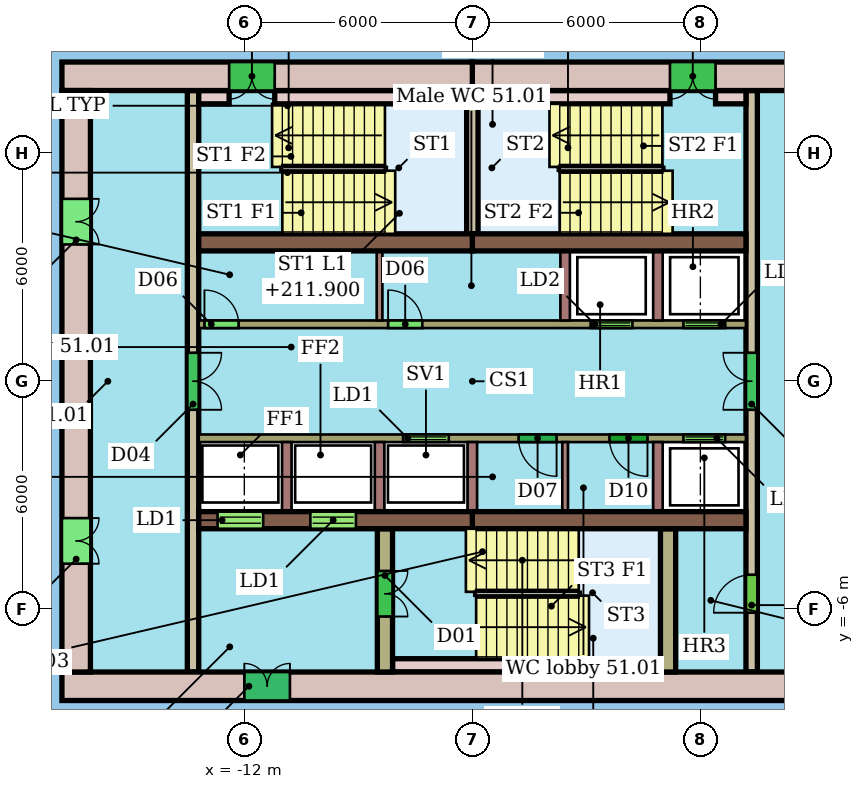
"""IFC4 building model, lengths in metres.
Left out: names, types, materials, properties, quantities, classifications, styles, units other than length and angle.
Written with IfcOpenShell. Run it as: python <this file> out.ifc"""

import sys

from ifc_helpers import new_model, si_unit, direction, frame, frame_2d, origin, place, context, subcontext, project, spatial, rectangle, extrude, element, fill, save


model = new_model("IFC4")
c1 = context("Model", 3, precision=1e-05, world=origin(), true_north=direction((0.0, 1.0)))
c2 = subcontext(c1, "Body", "Model", "MODEL_VIEW")
j1 = project(units=[si_unit("LENGTHUNIT", "METRE"), si_unit("PLANEANGLEUNIT", "RADIAN")], contexts=[c1])
p1 = place(None, origin())
s1 = spatial("IfcSite", under=j1, at=p1, CompositionType="ELEMENT")
p2 = place(p1, origin())
s2 = spatial("IfcBuilding", under=s1, at=p2, CompositionType="ELEMENT")
p3 = place(p2, frame((0.0, 0.0, 210.1)))
s3 = spatial("IfcBuildingStorey", under=s2, at=p3, CompositionType="ELEMENT", Elevation=210.1)
p4 = place(p3, frame((4.8, 8.025, 0.0), z_axis=(0.0, 0.0, 1.0), x_axis=(-1.0, 0.0, 0.0)))
e1 = element("IfcWall", 1, at=p4, inside=s3, PredefinedType="SHEAR", context=c2, shape_type="SweptSolid", body=[
    extrude(rectangle(XDim=10.8, YDim=0.75, at=frame_2d((5.4, 0.0))), origin(), (0.0, 0.0, 1.0), 3.3),
])
p5 = place(p4, frame((4.4, 0.0, 0.0)))
e2 = element("IfcOpeningElement", 2, at=p5, cuts=e1, PredefinedType="OPENING", context=c2, shape_type="SweptSolid", body=[
    extrude(rectangle(XDim=1.2, YDim=2.1, at=frame_2d((0.6, 1.05))), frame((0.0, 0.385, 0.0), z_axis=(0.0, -1.0, 0.0), x_axis=(1.0, 0.0, 0.0)), (0.0, 0.0, 1.0), 0.77),
])
p6 = place(p3, frame((-6.0, 8.025, 0.0), z_axis=(0.0, 0.0, 1.0), x_axis=(-1.0, 0.0, 0.0)))
e3 = element("IfcWall", 3, at=p6, inside=s3, PredefinedType="SHEAR", context=c2, shape_type="SweptSolid", body=[
    extrude(rectangle(XDim=10.8, YDim=0.75, at=frame_2d((5.4, 0.0))), origin(), (0.0, 0.0, 1.0), 3.3),
])
p7 = place(p6, frame((5.2, 0.0, 0.0)))
e4 = element("IfcOpeningElement", 4, at=p7, cuts=e3, PredefinedType="OPENING", context=c2, shape_type="SweptSolid", body=[
    extrude(rectangle(XDim=1.2, YDim=2.1, at=frame_2d((0.6, 1.05))), frame((0.0, 0.385, 0.0), z_axis=(0.0, -1.0, 0.0), x_axis=(1.0, 0.0, 0.0)), (0.0, 0.0, 1.0), 0.77),
])
p8 = place(p3, frame((-16.8, -8.025, 0.0), z_axis=(0.0, 0.0, 1.0), x_axis=(1.0, 0.0, 0.0)))
e5 = element("IfcWall", 5, at=p8, inside=s3, PredefinedType="SHEAR", context=c2, shape_type="SweptSolid", body=[
    extrude(rectangle(XDim=21.6, YDim=0.75, at=frame_2d((10.8, 0.0))), origin(), (0.0, 0.0, 1.0), 3.3),
])
p9 = place(p8, frame((4.8, 0.0, 0.0)))
e6 = element("IfcOpeningElement", 6, at=p9, cuts=e5, PredefinedType="OPENING", context=c2, shape_type="SweptSolid", body=[
    extrude(rectangle(XDim=1.2, YDim=2.1, at=frame_2d((0.6, 1.05))), frame((0.0, 0.385, 0.0), z_axis=(0.0, -1.0, 0.0), x_axis=(1.0, 0.0, 0.0)), (0.0, 0.0, 1.0), 0.77),
])
p10 = place(p3, frame((-16.425, 7.65, 0.0), z_axis=(0.0, 0.0, 1.0), x_axis=(0.0, -1.0, 0.0)))
e7 = element("IfcWall", 7, at=p10, inside=s3, PredefinedType="SHEAR", context=c2, shape_type="SweptSolid", body=[
    extrude(rectangle(XDim=15.3, YDim=0.75, at=frame_2d((7.65, 0.0))), origin(), (0.0, 0.0, 1.0), 3.3),
])
p11 = place(p10, frame((11.25, 0.0, 0.0)))
e8 = element("IfcOpeningElement", 8, at=p11, cuts=e7, PredefinedType="OPENING", context=c2, shape_type="SweptSolid", body=[
    extrude(rectangle(XDim=1.2, YDim=2.1, at=frame_2d((0.6, 1.05))), frame((0.0, 0.385, 0.0), z_axis=(0.0, -1.0, 0.0), x_axis=(1.0, 0.0, 0.0)), (0.0, 0.0, 1.0), 0.77),
])
p12 = place(p10, frame((2.85, 0.0, 0.0)))
e9 = element("IfcOpeningElement", 9, at=p12, cuts=e7, PredefinedType="OPENING", context=c2, shape_type="SweptSolid", body=[
    extrude(rectangle(XDim=1.2, YDim=2.1, at=frame_2d((0.6, 1.05))), frame((0.0, 0.385, 0.0), z_axis=(0.0, -1.0, 0.0), x_axis=(1.0, 0.0, 0.0)), (0.0, 0.0, 1.0), 0.77),
])
for number, where, z_axis, x_axis in (
    (10, (-13.2, 3.655, 0.0), (0.0, 0.0, 1.0), (1.0, 0.0, 0.0)),
    (11, (-6.0, 3.655, 0.0), (0.0, 0.0, 1.0), (1.0, 0.0, 0.0)),
):
    element("IfcWall", number, at=place(p3, frame(where, z_axis=z_axis, x_axis=x_axis)), inside=s3, PredefinedType="SHEAR", context=c2, shape_type="SweptSolid", body=[
        extrude(rectangle(XDim=7.2, YDim=0.45, at=frame_2d((3.6, 0.0))), origin(), (0.0, 0.0, 1.0), 3.3),
    ])
p13 = place(p3, frame((-13.2, -3.655, 0.0), z_axis=(0.0, 0.0, 1.0), x_axis=(1.0, 0.0, 0.0)))
e12 = element("IfcWall", 12, at=p13, inside=s3, PredefinedType="SHEAR", context=c2, shape_type="SweptSolid", body=[
    extrude(rectangle(XDim=7.2, YDim=0.45, at=frame_2d((3.6, 0.0))), origin(), (0.0, 0.0, 1.0), 3.3),
])
p14 = place(p13, frame((0.496, 0.0, 0.0)))
e13 = element("IfcOpeningElement", 13, at=p14, cuts=e12, PredefinedType="OPENING", context=c2, shape_type="SweptSolid", body=[
    extrude(rectangle(XDim=1.2, YDim=2.1, at=frame_2d((0.6, 1.05))), frame((0.0, 0.235, 0.0), z_axis=(0.0, -1.0, 0.0), x_axis=(1.0, 0.0, 0.0)), (0.0, 0.0, 1.0), 0.47),
])
p15 = place(p13, frame((2.938, 0.0, 0.0)))
e14 = element("IfcOpeningElement", 14, at=p15, cuts=e12, PredefinedType="OPENING", context=c2, shape_type="SweptSolid", body=[
    extrude(rectangle(XDim=1.2, YDim=2.1, at=frame_2d((0.6, 1.05))), frame((0.0, 0.235, 0.0), z_axis=(0.0, -1.0, 0.0), x_axis=(1.0, 0.0, 0.0)), (0.0, 0.0, 1.0), 0.47),
])
p16 = place(p3, frame((-6.0, -3.655, 0.0), z_axis=(0.0, 0.0, 1.0), x_axis=(1.0, 0.0, 0.0)))
e15 = element("IfcWall", 15, at=p16, inside=s3, PredefinedType="SHEAR", context=c2, shape_type="SweptSolid", body=[
    extrude(rectangle(XDim=7.2, YDim=0.45, at=frame_2d((3.6, 0.0))), origin(), (0.0, 0.0, 1.0), 3.3),
])
p17 = place(p3, frame((-13.35, 7.65, 0.0), z_axis=(0.0, 0.0, 1.0), x_axis=(0.0, -1.0, 0.0)))
e16 = element("IfcWall", 16, at=p17, inside=s3, PredefinedType="SHEAR", context=c2, shape_type="SweptSolid", body=[
    extrude(rectangle(XDim=15.3, YDim=0.3, at=frame_2d((7.65, 0.0))), origin(), (0.0, 0.0, 1.0), 3.3),
])
p18 = place(p17, frame((6.9, 0.0, 0.0)))
e17 = element("IfcOpeningElement", 17, at=p18, cuts=e16, PredefinedType="OPENING", context=c2, shape_type="SweptSolid", body=[
    extrude(rectangle(XDim=1.5, YDim=2.1, at=frame_2d((0.75, 1.05))), frame((0.0, 0.16, 0.0), z_axis=(0.0, -1.0, 0.0), x_axis=(1.0, 0.0, 0.0)), (0.0, 0.0, 1.0), 0.32),
])
p19 = place(p3, frame((1.35, -7.65, 0.0), z_axis=(0.0, 0.0, 1.0), x_axis=(0.0, 1.0, 0.0)))
e18 = element("IfcWall", 18, at=p19, inside=s3, PredefinedType="SHEAR", context=c2, shape_type="SweptSolid", body=[
    extrude(rectangle(XDim=15.3, YDim=0.3, at=frame_2d((7.65, 0.0))), origin(), (0.0, 0.0, 1.0), 3.3),
])
p20 = place(p19, frame((1.56, 0.0, 0.0)))
e19 = element("IfcOpeningElement", 19, at=p20, cuts=e18, PredefinedType="OPENING", context=c2, shape_type="SweptSolid", body=[
    extrude(rectangle(XDim=1.0, YDim=2.1, at=frame_2d((0.5, 1.05))), frame((0.0, 0.16, 0.0), z_axis=(0.0, -1.0, 0.0), x_axis=(1.0, 0.0, 0.0)), (0.0, 0.0, 1.0), 0.32),
])
p21 = place(p19, frame((6.9, 0.0, 0.0)))
e20 = element("IfcOpeningElement", 20, at=p21, cuts=e18, PredefinedType="OPENING", context=c2, shape_type="SweptSolid", body=[
    extrude(rectangle(XDim=1.5, YDim=2.1, at=frame_2d((0.75, 1.05))), frame((0.0, 0.16, 0.0), z_axis=(0.0, -1.0, 0.0), x_axis=(1.0, 0.0, 0.0)), (0.0, 0.0, 1.0), 0.32),
])
p22 = place(p3, frame((-13.2, 1.5, 0.0), z_axis=(0.0, 0.0, 1.0), x_axis=(1.0, 0.0, 0.0)))
e21 = element("IfcWall", 21, at=p22, inside=s3, PredefinedType="SHEAR", context=c2, shape_type="SweptSolid", body=[
    extrude(rectangle(XDim=14.4, YDim=0.2, at=frame_2d((7.2, 0.0))), origin(), (0.0, 0.0, 1.0), 3.3),
])
p23 = place(p22, frame((10.312, 0.0, 0.0)))
e22 = element("IfcOpeningElement", 22, at=p23, cuts=e21, PredefinedType="OPENING", context=c2, shape_type="SweptSolid", body=[
    extrude(rectangle(XDim=1.1, YDim=2.1, at=frame_2d((0.55, 1.05))), frame((0.0, 0.11, 0.0), z_axis=(0.0, -1.0, 0.0), x_axis=(1.0, 0.0, 0.0)), (0.0, 0.0, 1.0), 0.22),
])
p24 = place(p22, frame((12.754, 0.0, 0.0)))
e23 = element("IfcOpeningElement", 23, at=p24, cuts=e21, PredefinedType="OPENING", context=c2, shape_type="SweptSolid", body=[
    extrude(rectangle(XDim=1.1, YDim=2.1, at=frame_2d((0.55, 1.05))), frame((0.0, 0.11, 0.0), z_axis=(0.0, -1.0, 0.0), x_axis=(1.0, 0.0, 0.0)), (0.0, 0.0, 1.0), 0.22),
])
p25 = place(p22, frame((0.15, 0.0, 0.0)))
e24 = element("IfcOpeningElement", 24, at=p25, cuts=e21, PredefinedType="OPENING", context=c2, shape_type="SweptSolid", body=[
    extrude(rectangle(XDim=0.9, YDim=2.1, at=frame_2d((0.45, 1.05))), frame((0.0, 0.11, 0.0), z_axis=(0.0, -1.0, 0.0), x_axis=(1.0, 0.0, 0.0)), (0.0, 0.0, 1.0), 0.22),
])
p26 = place(p22, frame((4.983, 0.0, 0.0)))
e25 = element("IfcOpeningElement", 25, at=p26, cuts=e21, PredefinedType="OPENING", context=c2, shape_type="SweptSolid", body=[
    extrude(rectangle(XDim=0.9, YDim=2.1, at=frame_2d((0.45, 1.05))), frame((0.0, 0.11, 0.0), z_axis=(0.0, -1.0, 0.0), x_axis=(1.0, 0.0, 0.0)), (0.0, 0.0, 1.0), 0.22),
])
p27 = place(p3, frame((1.2, -1.5, 0.0), z_axis=(0.0, 0.0, 1.0), x_axis=(-1.0, 0.0, 0.0)))
e26 = element("IfcWall", 26, at=p27, inside=s3, PredefinedType="SHEAR", context=c2, shape_type="SweptSolid", body=[
    extrude(rectangle(XDim=14.4, YDim=0.2, at=frame_2d((7.2, 0.0))), origin(), (0.0, 0.0, 1.0), 3.3),
])
p28 = place(p27, frame((7.821, 0.0, 0.0)))
e27 = element("IfcOpeningElement", 27, at=p28, cuts=e26, PredefinedType="OPENING", context=c2, shape_type="SweptSolid", body=[
    extrude(rectangle(XDim=1.2, YDim=2.1, at=frame_2d((0.6, 1.05))), frame((0.0, 0.11, 0.0), z_axis=(0.0, -1.0, 0.0), x_axis=(1.0, 0.0, 0.0)), (0.0, 0.0, 1.0), 0.22),
])
p29 = place(p27, frame((0.546, 0.0, 0.0)))
e28 = element("IfcOpeningElement", 28, at=p29, cuts=e26, PredefinedType="OPENING", context=c2, shape_type="SweptSolid", body=[
    extrude(rectangle(XDim=1.1, YDim=2.1, at=frame_2d((0.55, 1.05))), frame((0.0, 0.11, 0.0), z_axis=(0.0, -1.0, 0.0), x_axis=(1.0, 0.0, 0.0)), (0.0, 0.0, 1.0), 0.22),
])
p30 = place(p27, frame((4.983, 0.0, 0.0)))
e29 = element("IfcOpeningElement", 29, at=p30, cuts=e26, PredefinedType="OPENING", context=c2, shape_type="SweptSolid", body=[
    extrude(rectangle(XDim=1.0, YDim=2.1, at=frame_2d((0.5, 1.05))), frame((0.0, 0.11, 0.0), z_axis=(0.0, -1.0, 0.0), x_axis=(1.0, 0.0, 0.0)), (0.0, 0.0, 1.0), 0.22),
])
p31 = place(p27, frame((2.592, 0.0, 0.0)))
e30 = element("IfcOpeningElement", 30, at=p31, cuts=e26, PredefinedType="OPENING", context=c2, shape_type="SweptSolid", body=[
    extrude(rectangle(XDim=1.0, YDim=2.1, at=frame_2d((0.5, 1.05))), frame((0.0, 0.11, 0.0), z_axis=(0.0, -1.0, 0.0), x_axis=(1.0, 0.0, 0.0)), (0.0, 0.0, 1.0), 0.22),
])
p32 = place(p3, frame((-8.3, -3.88, 0.0), z_axis=(0.0, 0.0, 1.0), x_axis=(0.0, -1.0, 0.0)))
e31 = element("IfcWall", 31, at=p32, inside=s3, PredefinedType="SHEAR", context=c2, shape_type="SweptSolid", body=[
    extrude(rectangle(XDim=3.77, YDim=0.4, at=frame_2d((1.885, 0.0))), origin(), (0.0, 0.0, 1.0), 3.3),
])
p33 = place(p32, frame((1.11, 0.0, 0.0)))
e32 = element("IfcOpeningElement", 32, at=p33, cuts=e31, PredefinedType="OPENING", context=c2, shape_type="SweptSolid", body=[
    extrude(rectangle(XDim=1.2, YDim=2.1, at=frame_2d((0.6, 1.05))), frame((0.0, 0.21, 0.0), z_axis=(0.0, -1.0, 0.0), x_axis=(1.0, 0.0, 0.0)), (0.0, 0.0, 1.0), 0.42),
])
p34 = place(p3, frame((-0.85, -3.88, 0.0), z_axis=(0.0, 0.0, 1.0), x_axis=(0.0, -1.0, 0.0)))
e33 = element("IfcWall", 33, at=p34, inside=s3, PredefinedType="SHEAR", context=c2, shape_type="SweptSolid", body=[
    extrude(rectangle(XDim=3.77, YDim=0.4, at=frame_2d((1.885, 0.0))), origin(), (0.0, 0.0, 1.0), 3.3),
])
p35 = place(p3, frame((-6.0, 3.88, 0.0), z_axis=(0.0, 0.0, 1.0), x_axis=(0.0, 1.0, 0.0)))
e34 = element("IfcWall", 34, at=p35, inside=s3, PredefinedType="SHEAR", context=c2, shape_type="SweptSolid", body=[
    extrude(rectangle(XDim=3.77, YDim=0.3, at=frame_2d((1.885, 0.0))), origin(), (0.0, 0.0, 1.0), 3.3),
])
p36 = place(p3, frame((-13.2, 7.475, 0.0), z_axis=(0.0, 0.0, 1.0), x_axis=(1.0, 0.0, 0.0)))
e35 = element("IfcWall", 35, at=p36, inside=s3, PredefinedType="SHEAR", context=c2, shape_type="SweptSolid", body=[
    extrude(rectangle(XDim=0.8, YDim=0.35, at=frame_2d((0.4, 0.0))), origin(), (0.0, 0.0, 1.0), 3.3),
])
for number, where, z_axis, x_axis in (
    (36, (-11.2, 7.475, 0.0), (0.0, 0.0, 1.0), (1.0, 0.0, 0.0)),
    (37, (-5.85, 7.475, 0.0), (0.0, 0.0, 1.0), (1.0, 0.0, 0.0)),
):
    element("IfcWall", number, at=place(p3, frame(where, z_axis=z_axis, x_axis=x_axis)), inside=s3, PredefinedType="SHEAR", context=c2, shape_type="SweptSolid", body=[
        extrude(rectangle(XDim=5.05, YDim=0.35, at=frame_2d((2.525, 0.0))), origin(), (0.0, 0.0, 1.0), 3.3),
    ])
p37 = place(p3, frame((0.4, 7.475, 0.0), z_axis=(0.0, 0.0, 1.0), x_axis=(1.0, 0.0, 0.0)))
e38 = element("IfcWall", 38, at=p37, inside=s3, PredefinedType="SHEAR", context=c2, shape_type="SweptSolid", body=[
    extrude(rectangle(XDim=0.8, YDim=0.35, at=frame_2d((0.4, 0.0))), origin(), (0.0, 0.0, 1.0), 3.3),
])
p38 = place(p3, frame((-8.1, -7.475, 0.0), z_axis=(0.0, 0.0, 1.0), x_axis=(1.0, 0.0, 0.0)))
e39 = element("IfcWall", 39, at=p38, inside=s3, PredefinedType="SHEAR", context=c2, shape_type="SweptSolid", body=[
    extrude(rectangle(XDim=7.05, YDim=0.35, at=frame_2d((3.525, 0.0))), origin(), (0.0, 0.0, 1.0), 3.3),
])
for number, where, z_axis, x_axis in (
    (40, (-3.558, 1.6, 0.0), (0.0, 0.0, 1.0), (0.0, 1.0, 0.0)),
    (41, (-1.117, 1.6, 0.0), (0.0, 0.0, 1.0), (0.0, 1.0, 0.0)),
):
    element("IfcWall", number, at=place(p3, frame(where, z_axis=z_axis, x_axis=x_axis)), inside=s3, PredefinedType="SHEAR", context=c2, shape_type="SweptSolid", body=[
        extrude(rectangle(XDim=1.83, YDim=0.25, at=frame_2d((0.915, 0.0))), origin(), (0.0, 0.0, 1.0), 3.3),
    ])
p39 = place(p3, frame((-8.442, 1.6, 0.0), z_axis=(0.0, 0.0, 1.0), x_axis=(0.0, 1.0, 0.0)))
e42 = element("IfcWall", 42, at=p39, inside=s3, PredefinedType="PARTITIONING", context=c2, shape_type="SweptSolid", body=[
    extrude(rectangle(XDim=1.83, YDim=0.15, at=frame_2d((0.915, 0.0))), origin(), (0.0, 0.0, 1.0), 3.3),
])
for number, where, z_axis, x_axis in (
    (43, (-10.883, -1.6, 0.0), (0.0, 0.0, 1.0), (0.0, -1.0, 0.0)),
    (44, (-8.442, -1.6, 0.0), (0.0, 0.0, 1.0), (0.0, -1.0, 0.0)),
    (45, (-6.0, -1.6, 0.0), (0.0, 0.0, 1.0), (0.0, -1.0, 0.0)),
    (46, (-1.117, -1.6, 0.0), (0.0, 0.0, 1.0), (0.0, -1.0, 0.0)),
):
    element("IfcWall", number, at=place(p3, frame(where, z_axis=z_axis, x_axis=x_axis)), inside=s3, PredefinedType="SHEAR", context=c2, shape_type="SweptSolid", body=[
        extrude(rectangle(XDim=1.83, YDim=0.25, at=frame_2d((0.915, 0.0))), origin(), (0.0, 0.0, 1.0), 3.3),
    ])
p40 = place(p3, frame((-3.558, -1.6, 0.0), z_axis=(0.0, 0.0, 1.0), x_axis=(0.0, -1.0, 0.0)))
e47 = element("IfcWall", 47, at=p40, inside=s3, PredefinedType="PARTITIONING", context=c2, shape_type="SweptSolid", body=[
    extrude(rectangle(XDim=1.83, YDim=0.15, at=frame_2d((0.915, 0.0))), origin(), (0.0, 0.0, 1.0), 3.3),
])
p41 = place(p5, origin())
e48 = element("IfcDoor", 48, at=p41, inside=s3, OperationType="DOUBLE_DOOR_SINGLE_SWING", PredefinedType="NOTDEFINED", context=c2, shape_type="SweptSolid", body=[
    extrude(rectangle(XDim=1.2, YDim=2.1, at=frame_2d((0.6, 1.05))), frame((0.0, 0.025, 0.0), z_axis=(0.0, -1.0, 0.0), x_axis=(1.0, 0.0, 0.0)), (0.0, 0.0, 1.0), 0.05),
])
fill(e2, e48)
p42 = place(p7, origin())
e49 = element("IfcDoor", 49, at=p42, inside=s3, OperationType="DOUBLE_DOOR_SINGLE_SWING", PredefinedType="NOTDEFINED", context=c2, shape_type="SweptSolid", body=[
    extrude(rectangle(XDim=1.2, YDim=2.1, at=frame_2d((0.6, 1.05))), frame((0.0, 0.025, 0.0), z_axis=(0.0, -1.0, 0.0), x_axis=(1.0, 0.0, 0.0)), (0.0, 0.0, 1.0), 0.05),
])
fill(e4, e49)
p43 = place(p9, origin())
e50 = element("IfcDoor", 50, at=p43, inside=s3, OperationType="DOUBLE_DOOR_SINGLE_SWING", PredefinedType="NOTDEFINED", context=c2, shape_type="SweptSolid", body=[
    extrude(rectangle(XDim=1.2, YDim=2.1, at=frame_2d((0.6, 1.05))), frame((0.0, 0.025, 0.0), z_axis=(0.0, -1.0, 0.0), x_axis=(1.0, 0.0, 0.0)), (0.0, 0.0, 1.0), 0.05),
])
fill(e6, e50)
p44 = place(p11, origin())
e51 = element("IfcDoor", 51, at=p44, inside=s3, OperationType="DOUBLE_DOOR_SINGLE_SWING", PredefinedType="NOTDEFINED", context=c2, shape_type="SweptSolid", body=[
    extrude(rectangle(XDim=1.2, YDim=2.1, at=frame_2d((0.6, 1.05))), frame((0.0, 0.025, 0.0), z_axis=(0.0, -1.0, 0.0), x_axis=(1.0, 0.0, 0.0)), (0.0, 0.0, 1.0), 0.05),
])
fill(e8, e51)
p45 = place(p12, origin())
e52 = element("IfcDoor", 52, at=p45, inside=s3, OperationType="DOUBLE_DOOR_SINGLE_SWING", PredefinedType="NOTDEFINED", context=c2, shape_type="SweptSolid", body=[
    extrude(rectangle(XDim=1.2, YDim=2.1, at=frame_2d((0.6, 1.05))), frame((0.0, 0.025, 0.0), z_axis=(0.0, -1.0, 0.0), x_axis=(1.0, 0.0, 0.0)), (0.0, 0.0, 1.0), 0.05),
])
fill(e9, e52)
p46 = place(p14, origin())
e53 = element("IfcDoor", 53, at=p46, inside=s3, OperationType="DOUBLE_DOOR_SLIDING", PredefinedType="NOTDEFINED", context=c2, shape_type="SweptSolid", body=[
    extrude(rectangle(XDim=1.2, YDim=2.1, at=frame_2d((0.6, 1.05))), frame((0.0, 0.025, 0.0), z_axis=(0.0, -1.0, 0.0), x_axis=(1.0, 0.0, 0.0)), (0.0, 0.0, 1.0), 0.05),
])
fill(e13, e53)
p47 = place(p15, origin())
e54 = element("IfcDoor", 54, at=p47, inside=s3, OperationType="DOUBLE_DOOR_SLIDING", PredefinedType="NOTDEFINED", context=c2, shape_type="SweptSolid", body=[
    extrude(rectangle(XDim=1.2, YDim=2.1, at=frame_2d((0.6, 1.05))), frame((0.0, 0.025, 0.0), z_axis=(0.0, -1.0, 0.0), x_axis=(1.0, 0.0, 0.0)), (0.0, 0.0, 1.0), 0.05),
])
fill(e14, e54)
p48 = place(p18, origin())
e55 = element("IfcDoor", 55, at=p48, inside=s3, OperationType="DOUBLE_DOOR_SINGLE_SWING", PredefinedType="NOTDEFINED", context=c2, shape_type="SweptSolid", body=[
    extrude(rectangle(XDim=1.5, YDim=2.1, at=frame_2d((0.75, 1.05))), frame((0.0, 0.025, 0.0), z_axis=(0.0, -1.0, 0.0), x_axis=(1.0, 0.0, 0.0)), (0.0, 0.0, 1.0), 0.05),
])
fill(e17, e55)
p49 = place(p20, origin())
e56 = element("IfcDoor", 56, at=p49, inside=s3, OperationType="SINGLE_SWING_LEFT", PredefinedType="NOTDEFINED", context=c2, shape_type="SweptSolid", body=[
    extrude(rectangle(XDim=1.0, YDim=2.1, at=frame_2d((0.5, 1.05))), frame((0.0, 0.025, 0.0), z_axis=(0.0, -1.0, 0.0), x_axis=(1.0, 0.0, 0.0)), (0.0, 0.0, 1.0), 0.05),
])
fill(e19, e56)
p50 = place(p21, origin())
e57 = element("IfcDoor", 57, at=p50, inside=s3, OperationType="DOUBLE_DOOR_SINGLE_SWING", PredefinedType="NOTDEFINED", context=c2, shape_type="SweptSolid", body=[
    extrude(rectangle(XDim=1.5, YDim=2.1, at=frame_2d((0.75, 1.05))), frame((0.0, 0.025, 0.0), z_axis=(0.0, -1.0, 0.0), x_axis=(1.0, 0.0, 0.0)), (0.0, 0.0, 1.0), 0.05),
])
fill(e20, e57)
p51 = place(p23, origin())
e58 = element("IfcDoor", 58, at=p51, inside=s3, OperationType="DOUBLE_DOOR_SLIDING", PredefinedType="NOTDEFINED", context=c2, shape_type="SweptSolid", body=[
    extrude(rectangle(XDim=1.1, YDim=2.1, at=frame_2d((0.55, 1.05))), frame((0.0, 0.025, 0.0), z_axis=(0.0, -1.0, 0.0), x_axis=(1.0, 0.0, 0.0)), (0.0, 0.0, 1.0), 0.05),
])
fill(e22, e58)
p52 = place(p24, origin())
e59 = element("IfcDoor", 59, at=p52, inside=s3, OperationType="DOUBLE_DOOR_SLIDING", PredefinedType="NOTDEFINED", context=c2, shape_type="SweptSolid", body=[
    extrude(rectangle(XDim=1.1, YDim=2.1, at=frame_2d((0.55, 1.05))), frame((0.0, 0.025, 0.0), z_axis=(0.0, -1.0, 0.0), x_axis=(1.0, 0.0, 0.0)), (0.0, 0.0, 1.0), 0.05),
])
fill(e23, e59)
p53 = place(p25, origin())
e60 = element("IfcDoor", 60, at=p53, inside=s3, OperationType="SINGLE_SWING_LEFT", PredefinedType="NOTDEFINED", context=c2, shape_type="SweptSolid", body=[
    extrude(rectangle(XDim=0.9, YDim=2.1, at=frame_2d((0.45, 1.05))), frame((0.0, 0.025, 0.0), z_axis=(0.0, -1.0, 0.0), x_axis=(1.0, 0.0, 0.0)), (0.0, 0.0, 1.0), 0.05),
])
fill(e24, e60)
p54 = place(p26, origin())
e61 = element("IfcDoor", 61, at=p54, inside=s3, OperationType="SINGLE_SWING_LEFT", PredefinedType="NOTDEFINED", context=c2, shape_type="SweptSolid", body=[
    extrude(rectangle(XDim=0.9, YDim=2.1, at=frame_2d((0.45, 1.05))), frame((0.0, 0.025, 0.0), z_axis=(0.0, -1.0, 0.0), x_axis=(1.0, 0.0, 0.0)), (0.0, 0.0, 1.0), 0.05),
])
fill(e25, e61)
p55 = place(p28, origin())
e62 = element("IfcDoor", 62, at=p55, inside=s3, OperationType="DOUBLE_DOOR_SLIDING", PredefinedType="NOTDEFINED", context=c2, shape_type="SweptSolid", body=[
    extrude(rectangle(XDim=1.2, YDim=2.1, at=frame_2d((0.6, 1.05))), frame((0.0, 0.025, 0.0), z_axis=(0.0, -1.0, 0.0), x_axis=(1.0, 0.0, 0.0)), (0.0, 0.0, 1.0), 0.05),
])
fill(e27, e62)
p56 = place(p29, origin())
e63 = element("IfcDoor", 63, at=p56, inside=s3, OperationType="DOUBLE_DOOR_SLIDING", PredefinedType="NOTDEFINED", context=c2, shape_type="SweptSolid", body=[
    extrude(rectangle(XDim=1.1, YDim=2.1, at=frame_2d((0.55, 1.05))), frame((0.0, 0.025, 0.0), z_axis=(0.0, -1.0, 0.0), x_axis=(1.0, 0.0, 0.0)), (0.0, 0.0, 1.0), 0.05),
])
fill(e28, e63)
p57 = place(p30, origin())
e64 = element("IfcDoor", 64, at=p57, inside=s3, OperationType="SINGLE_SWING_LEFT", PredefinedType="NOTDEFINED", context=c2, shape_type="SweptSolid", body=[
    extrude(rectangle(XDim=1.0, YDim=2.1, at=frame_2d((0.5, 1.05))), frame((0.0, 0.025, 0.0), z_axis=(0.0, -1.0, 0.0), x_axis=(1.0, 0.0, 0.0)), (0.0, 0.0, 1.0), 0.05),
])
fill(e29, e64)
p58 = place(p31, origin())
e65 = element("IfcDoor", 65, at=p58, inside=s3, OperationType="SINGLE_SWING_LEFT", PredefinedType="NOTDEFINED", context=c2, shape_type="SweptSolid", body=[
    extrude(rectangle(XDim=1.0, YDim=2.1, at=frame_2d((0.5, 1.05))), frame((0.0, 0.025, 0.0), z_axis=(0.0, -1.0, 0.0), x_axis=(1.0, 0.0, 0.0)), (0.0, 0.0, 1.0), 0.05),
])
fill(e30, e65)
p59 = place(p33, origin())
e66 = element("IfcDoor", 66, at=p59, inside=s3, OperationType="DOUBLE_DOOR_SINGLE_SWING", PredefinedType="NOTDEFINED", context=c2, shape_type="SweptSolid", body=[
    extrude(rectangle(XDim=1.2, YDim=2.1, at=frame_2d((0.6, 1.05))), frame((0.0, 0.025, 0.0), z_axis=(0.0, -1.0, 0.0), x_axis=(1.0, 0.0, 0.0)), (0.0, 0.0, 1.0), 0.05),
])
fill(e32, e66)
save(model, sys.argv[1])
